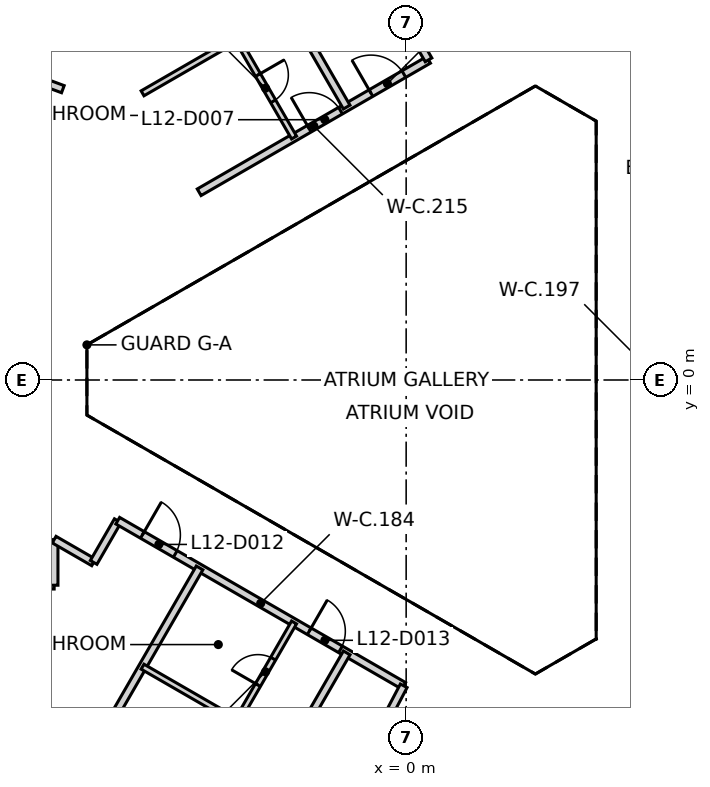
"""IFC4 building model, lengths in metres.
Left out: names, types, materials, properties, quantities, classifications, styles, units other than length and angle.
Written with IfcOpenShell. Run it as: python <this file> out.ifc"""

import sys

from ifc_helpers import new_model, si_unit, direction, frame, frame_2d, origin, place, context, subcontext, project, spatial, rectangle, extrude, element, fill, save


model = new_model("IFC4")
c1 = context("Model", 3, precision=1e-05, world=origin(), true_north=direction((0.0, 1.0)))
c2 = subcontext(c1, "Body", "Model", "MODEL_VIEW")
j1 = project(units=[si_unit("LENGTHUNIT", "METRE"), si_unit("PLANEANGLEUNIT", "RADIAN")], contexts=[c1])
p1 = place(None, origin())
s1 = spatial("IfcSite", under=j1, at=p1, CompositionType="ELEMENT")
p2 = place(p1, origin())
s2 = spatial("IfcBuilding", under=s1, at=p2, CompositionType="ELEMENT")
p3 = place(p2, frame((0.0, 0.0, 56.6)))
s3 = spatial("IfcBuildingStorey", under=s2, at=p3, CompositionType="ELEMENT", Elevation=56.6)
p4 = place(p3, frame((10.42, 6.498, 0.0), z_axis=(0.0, 0.0, 1.0), x_axis=(-0.866021906294, 0.500006057782, 0.0)))
e1 = element("IfcWall", 1, at=p4, inside=s3, PredefinedType="SHEAR", context=c2, shape_type="SweptSolid", body=[
    extrude(rectangle(XDim=11.55, YDim=0.25, at=frame_2d((5.775, 0.0))), origin(), (0.0, 0.0, 1.0), 3.125),
])
p5 = place(p4, frame((10.025, 0.0, 0.0)))
e2 = element("IfcOpeningElement", 2, at=p5, cuts=e1, PredefinedType="OPENING", context=c2, shape_type="SweptSolid", body=[
    extrude(rectangle(XDim=1.2, YDim=2.1, at=frame_2d((0.6, 1.05))), frame((0.0, 0.135, 0.0), z_axis=(0.0, -1.0, 0.0), x_axis=(1.0, 0.0, 0.0)), (0.0, 0.0, 1.0), 0.27),
])
p6 = place(p4, frame((8.725, 0.0, 0.0)))
e3 = element("IfcOpeningElement", 3, at=p6, cuts=e1, PredefinedType="OPENING", context=c2, shape_type="SweptSolid", body=[
    extrude(rectangle(XDim=1.2, YDim=2.1, at=frame_2d((0.6, 1.05))), frame((0.0, 0.135, 0.0), z_axis=(0.0, -1.0, 0.0), x_axis=(1.0, 0.0, 0.0)), (0.0, 0.0, 1.0), 0.27),
])
p7 = place(p3, frame((0.417, -12.273, 0.0), z_axis=(0.0, 0.0, 1.0), x_axis=(0.866021906294, 0.500006057782, 0.0)))
e4 = element("IfcWall", 4, at=p7, inside=s3, PredefinedType="SHEAR", context=c2, shape_type="SweptSolid", body=[
    extrude(rectangle(XDim=11.55, YDim=0.25, at=frame_2d((5.775, 0.0))), origin(), (0.0, 0.0, 1.0), 3.125),
])
p8 = place(p7, frame((10.025, 0.0, 0.0)))
e5 = element("IfcOpeningElement", 5, at=p8, cuts=e4, PredefinedType="OPENING", context=c2, shape_type="SweptSolid", body=[
    extrude(rectangle(XDim=1.2, YDim=2.1, at=frame_2d((0.6, 1.05))), frame((0.0, 0.135, 0.0), z_axis=(0.0, -1.0, 0.0), x_axis=(1.0, 0.0, 0.0)), (0.0, 0.0, 1.0), 0.27),
])
p9 = place(p7, frame((8.725, 0.0, 0.0)))
e6 = element("IfcOpeningElement", 6, at=p9, cuts=e4, PredefinedType="OPENING", context=c2, shape_type="SweptSolid", body=[
    extrude(rectangle(XDim=1.2, YDim=2.1, at=frame_2d((0.6, 1.05))), frame((0.0, 0.135, 0.0), z_axis=(0.0, -1.0, 0.0), x_axis=(1.0, 0.0, 0.0)), (0.0, 0.0, 1.0), 0.27),
])
p10 = place(p3, frame((-16.026, 10.247, 0.0), z_axis=(0.0, 0.0, 1.0), x_axis=(0.937540909117, -0.347875040397, 0.0)))
e7 = element("IfcWall", 7, at=p10, inside=s3, PredefinedType="PARTITIONING", context=c2, shape_type="SweptSolid", body=[
    extrude(rectangle(XDim=7.459, YDim=0.2, at=frame_2d((3.729, 0.0))), origin(), (0.0, 0.0, 1.0), 3.125),
])
p11 = place(p10, frame((3.396, 0.0, 0.0)))
e8 = element("IfcOpeningElement", 8, at=p11, cuts=e7, PredefinedType="OPENING", context=c2, shape_type="SweptSolid", body=[
    extrude(rectangle(XDim=0.95, YDim=2.1, at=frame_2d((0.475, 1.05))), frame((0.0, 0.11, 0.0), z_axis=(0.0, -1.0, 0.0), x_axis=(1.0, 0.0, 0.0)), (0.0, 0.0, 1.0), 0.22),
])
p12 = place(p3, frame((-10.652, -5.4, 0.0), z_axis=(0.0, 0.0, 1.0), x_axis=(1.0, 0.0, 0.0)))
e9 = element("IfcWall", 9, at=p12, inside=s3, PredefinedType="PARTITIONING", context=c2, shape_type="SweptSolid", body=[
    extrude(rectangle(XDim=1.39, YDim=0.2, at=frame_2d((0.695, 0.0))), origin(), (0.0, 0.0, 1.0), 3.125),
])
for number, where, z_axis, x_axis in (
    (10, (-9.262, -5.4, 0.0), (0.0, 0.0, 1.0), (0.0, 1.0, 0.0)),
    (11, (-9.262, -4.2, 0.0), (0.0, 0.0, 1.0), (0.866, -0.5, 0.0)),
):
    element("IfcWall", number, at=place(p3, frame(where, z_axis=z_axis, x_axis=x_axis)), inside=s3, PredefinedType="PARTITIONING", context=c2, shape_type="SweptSolid", body=[
        extrude(rectangle(XDim=1.2, YDim=0.2, at=frame_2d((0.6, 0.0))), origin(), (0.0, 0.0, 1.0), 3.125),
    ])
p13 = place(p3, frame((-8.223, -4.8, 0.0), z_axis=(0.0, 0.0, 1.0), x_axis=(0.499866914522, 0.866102227088, 0.0)))
e12 = element("IfcWall", 12, at=p13, inside=s3, PredefinedType="PARTITIONING", context=c2, shape_type="SweptSolid", body=[
    extrude(rectangle(XDim=1.268, YDim=0.2, at=frame_2d((0.634, 0.0))), origin(), (0.0, 0.0, 1.0), 3.125),
])
p14 = place(p3, frame((-7.589, -3.702, 0.0), z_axis=(0.0, 0.0, 1.0), x_axis=(0.865995139556, -0.500052415518, 0.0)))
e13 = element("IfcWall", 13, at=p14, inside=s3, PredefinedType="PARTITIONING", context=c2, shape_type="SweptSolid", body=[
    extrude(rectangle(XDim=8.689, YDim=0.2, at=frame_2d((4.344, 0.0))), origin(), (0.0, 0.0, 1.0), 3.125),
])
p15 = place(p14, frame((0.749, 0.0, 0.0)))
e14 = element("IfcOpeningElement", 14, at=p15, cuts=e13, PredefinedType="OPENING", context=c2, shape_type="SweptSolid", body=[
    extrude(rectangle(XDim=1.0, YDim=2.1, at=frame_2d((0.5, 1.05))), frame((0.0, 0.11, 0.0), z_axis=(0.0, -1.0, 0.0), x_axis=(1.0, 0.0, 0.0)), (0.0, 0.0, 1.0), 0.22),
])
p16 = place(p14, frame((5.819, 0.0, 0.0)))
e15 = element("IfcOpeningElement", 15, at=p16, cuts=e13, PredefinedType="OPENING", context=c2, shape_type="SweptSolid", body=[
    extrude(rectangle(XDim=0.95, YDim=2.1, at=frame_2d((0.475, 1.05))), frame((0.0, 0.11, 0.0), z_axis=(0.0, -1.0, 0.0), x_axis=(1.0, 0.0, 0.0)), (0.0, 0.0, 1.0), 0.22),
])
p17 = place(p3, frame((-5.446, 4.94, 0.0), z_axis=(0.0, 0.0, 1.0), x_axis=(0.866096332545, 0.499877127655, 0.0)))
e16 = element("IfcWall", 16, at=p17, inside=s3, PredefinedType="PARTITIONING", context=c2, shape_type="SweptSolid", body=[
    extrude(rectangle(XDim=6.969, YDim=0.2, at=frame_2d((3.484, 0.0))), origin(), (0.0, 0.0, 1.0), 3.125),
])
p18 = place(p17, frame((5.219, 0.0, 0.0)))
e17 = element("IfcOpeningElement", 17, at=p18, cuts=e16, PredefinedType="OPENING", context=c2, shape_type="SweptSolid", body=[
    extrude(rectangle(XDim=1.0, YDim=2.1, at=frame_2d((0.5, 1.05))), frame((0.0, 0.11, 0.0), z_axis=(0.0, -1.0, 0.0), x_axis=(1.0, 0.0, 0.0)), (0.0, 0.0, 1.0), 0.22),
])
p19 = place(p17, frame((3.344, 0.0, 0.0)))
e18 = element("IfcOpeningElement", 18, at=p19, cuts=e16, PredefinedType="OPENING", context=c2, shape_type="SweptSolid", body=[
    extrude(rectangle(XDim=0.95, YDim=2.1, at=frame_2d((0.475, 1.05))), frame((0.0, 0.11, 0.0), z_axis=(0.0, -1.0, 0.0), x_axis=(1.0, 0.0, 0.0)), (0.0, 0.0, 1.0), 0.22),
])
p20 = place(p3, frame((-2.162, -12.041, 0.0), z_axis=(0.0, 0.0, 1.0), x_axis=(0.464956890881, 0.885333321197, 0.0)))
e19 = element("IfcWall", 19, at=p20, inside=s3, PredefinedType="PARTITIONING", context=c2, shape_type="SweptSolid", body=[
    extrude(rectangle(XDim=4.512, YDim=0.2, at=frame_2d((2.256, 0.0))), origin(), (0.0, 0.0, 1.0), 3.125),
])
p21 = place(p20, frame((1.756, 0.0, 0.0)))
e20 = element("IfcOpeningElement", 20, at=p21, cuts=e19, PredefinedType="OPENING", context=c2, shape_type="SweptSolid", body=[
    extrude(rectangle(XDim=1.0, YDim=2.1, at=frame_2d((0.5, 1.05))), frame((0.0, 0.11, 0.0), z_axis=(0.0, -1.0, 0.0), x_axis=(1.0, 0.0, 0.0)), (0.0, 0.0, 1.0), 0.22),
])
p22 = place(p3, frame((-0.045, 9.521, 0.0), z_axis=(0.0, 0.0, 1.0), x_axis=(0.500094716449, -0.865970712311, 0.0)))
e21 = element("IfcWall", 21, at=p22, inside=s3, PredefinedType="PARTITIONING", context=c2, shape_type="SweptSolid", body=[
    extrude(rectangle(XDim=1.268, YDim=0.2, at=frame_2d((0.634, 0.0))), origin(), (0.0, 0.0, 1.0), 3.125),
])
p23 = place(p3, frame((-14.148, -20.035, 0.0), z_axis=(0.0, 0.0, 1.0), x_axis=(0.500005855417, 0.866022023131, 0.0)))
e22 = element("IfcWall", 22, at=p23, inside=s3, PredefinedType="PARTITIONING", context=c2, shape_type="SweptSolid", body=[
    extrude(rectangle(XDim=17.425, YDim=0.2, at=frame_2d((8.712, 0.0))), origin(), (0.0, 0.0, 1.0), 3.125),
])
p24 = place(p3, frame((-10.276, 22.271, 0.0), z_axis=(0.0, 0.0, 1.0), x_axis=(0.499975954304, -0.866039286129, 0.0)))
e23 = element("IfcWall", 23, at=p24, inside=s3, PredefinedType="PARTITIONING", context=c2, shape_type="SweptSolid", body=[
    extrude(rectangle(XDim=17.424, YDim=0.2, at=frame_2d((8.712, 0.0))), origin(), (0.0, 0.0, 1.0), 3.125),
])
p25 = place(p3, frame((-10.276, -22.271, 0.0), z_axis=(0.0, 0.0, 1.0), x_axis=(0.49999372146, 0.866029028671, 0.0)))
e24 = element("IfcWall", 24, at=p25, inside=s3, PredefinedType="PARTITIONING", context=c2, shape_type="SweptSolid", body=[
    extrude(rectangle(XDim=17.425, YDim=0.2, at=frame_2d((8.712, 0.0))), origin(), (0.0, 0.0, 1.0), 3.125),
])
for number, where, z_axis, x_axis in (
    (25, (-6.936, -7.543, 0.0), (0.0, 0.0, 1.0), (0.866, -0.5, 0.0)),
    (26, (-6.936, 7.543, 0.0), (0.0, 0.0, 1.0), (0.866, 0.5, 0.0)),
):
    element("IfcWall", number, at=place(p3, frame(where, z_axis=z_axis, x_axis=x_axis)), inside=s3, PredefinedType="PARTITIONING", context=c2, shape_type="SweptSolid", body=[
        extrude(rectangle(XDim=2.871, YDim=0.15, at=frame_2d((1.436, 0.0))), origin(), (0.0, 0.0, 1.0), 3.125),
    ])
p26 = place(p3, frame((-4.449, -8.978, 0.0), z_axis=(0.0, 0.0, 1.0), x_axis=(0.499745940409, 0.866172035478, 0.0)))
e27 = element("IfcWall", 27, at=p26, inside=s3, PredefinedType="PARTITIONING", context=c2, shape_type="SweptSolid", body=[
    extrude(rectangle(XDim=3.0, YDim=0.15, at=frame_2d((1.5, 0.0))), origin(), (0.0, 0.0, 1.0), 3.125),
])
p27 = place(p26, frame((1.1, 0.0, 0.0)))
e28 = element("IfcOpeningElement", 28, at=p27, cuts=e27, PredefinedType="OPENING", context=c2, shape_type="SweptSolid", body=[
    extrude(rectangle(XDim=0.8, YDim=2.1, at=frame_2d((0.4, 1.05))), frame((0.0, 0.085, 0.0), z_axis=(0.0, -1.0, 0.0), x_axis=(1.0, 0.0, 0.0)), (0.0, 0.0, 1.0), 0.17),
])
p28 = place(p3, frame((-4.449, 8.978, 0.0), z_axis=(0.0, 0.0, 1.0), x_axis=(0.499745940409, -0.866172035478, 0.0)))
e29 = element("IfcWall", 29, at=p28, inside=s3, PredefinedType="PARTITIONING", context=c2, shape_type="SweptSolid", body=[
    extrude(rectangle(XDim=3.0, YDim=0.15, at=frame_2d((1.5, 0.0))), origin(), (0.0, 0.0, 1.0), 3.125),
])
p29 = place(p28, frame((1.1, 0.0, 0.0)))
e30 = element("IfcOpeningElement", 30, at=p29, cuts=e29, PredefinedType="OPENING", context=c2, shape_type="SweptSolid", body=[
    extrude(rectangle(XDim=0.8, YDim=2.1, at=frame_2d((0.4, 1.05))), frame((0.0, 0.085, 0.0), z_axis=(0.0, -1.0, 0.0), x_axis=(1.0, 0.0, 0.0)), (0.0, 0.0, 1.0), 0.17),
])
p30 = place(p18, origin())
e31 = element("IfcDoor", 31, at=p30, inside=s3, OperationType="SINGLE_SWING_LEFT", PredefinedType="DOOR", context=c2, shape_type="SweptSolid", body=[
    extrude(rectangle(XDim=1.0, YDim=2.1, at=frame_2d((0.5, 1.05))), frame((0.0, 0.025, 0.0), z_axis=(0.0, -1.0, 0.0), x_axis=(1.0, 0.0, 0.0)), (0.0, 0.0, 1.0), 0.05),
])
fill(e17, e31)
p31 = place(p19, origin())
e32 = element("IfcDoor", 32, at=p31, inside=s3, OperationType="SINGLE_SWING_LEFT", PredefinedType="DOOR", context=c2, shape_type="SweptSolid", body=[
    extrude(rectangle(XDim=0.95, YDim=2.1, at=frame_2d((0.475, 1.05))), frame((0.0, 0.025, 0.0), z_axis=(0.0, -1.0, 0.0), x_axis=(1.0, 0.0, 0.0)), (0.0, 0.0, 1.0), 0.05),
])
fill(e18, e32)
p32 = place(p29, frame((0.8, 0.0, 0.0), z_axis=(0.0, 0.0, 1.0), x_axis=(-1.0, 0.0, 0.0)))
e33 = element("IfcDoor", 33, at=p32, inside=s3, OperationType="SINGLE_SWING_LEFT", PredefinedType="DOOR", context=c2, shape_type="SweptSolid", body=[
    extrude(rectangle(XDim=0.8, YDim=2.1, at=frame_2d((0.4, 1.05))), frame((0.0, 0.025, 0.0), z_axis=(0.0, -1.0, 0.0), x_axis=(1.0, 0.0, 0.0)), (0.0, 0.0, 1.0), 0.05),
])
fill(e30, e33)
p33 = place(p15, frame((1.0, 0.0, 0.0), z_axis=(0.0, 0.0, 1.0), x_axis=(-1.0, 0.0, 0.0)))
e34 = element("IfcDoor", 34, at=p33, inside=s3, OperationType="SINGLE_SWING_LEFT", PredefinedType="DOOR", context=c2, shape_type="SweptSolid", body=[
    extrude(rectangle(XDim=1.0, YDim=2.1, at=frame_2d((0.5, 1.05))), frame((0.0, 0.025, 0.0), z_axis=(0.0, -1.0, 0.0), x_axis=(1.0, 0.0, 0.0)), (0.0, 0.0, 1.0), 0.05),
])
fill(e14, e34)
p34 = place(p16, frame((0.95, 0.0, 0.0), z_axis=(0.0, 0.0, 1.0), x_axis=(-1.0, 0.0, 0.0)))
e35 = element("IfcDoor", 35, at=p34, inside=s3, OperationType="SINGLE_SWING_LEFT", PredefinedType="DOOR", context=c2, shape_type="SweptSolid", body=[
    extrude(rectangle(XDim=0.95, YDim=2.1, at=frame_2d((0.475, 1.05))), frame((0.0, 0.025, 0.0), z_axis=(0.0, -1.0, 0.0), x_axis=(1.0, 0.0, 0.0)), (0.0, 0.0, 1.0), 0.05),
])
fill(e15, e35)
p35 = place(p27, origin())
e36 = element("IfcDoor", 36, at=p35, inside=s3, OperationType="SINGLE_SWING_LEFT", PredefinedType="DOOR", context=c2, shape_type="SweptSolid", body=[
    extrude(rectangle(XDim=0.8, YDim=2.1, at=frame_2d((0.4, 1.05))), frame((0.0, 0.025, 0.0), z_axis=(0.0, -1.0, 0.0), x_axis=(1.0, 0.0, 0.0)), (0.0, 0.0, 1.0), 0.05),
])
fill(e28, e36)
save(model, sys.argv[1])
